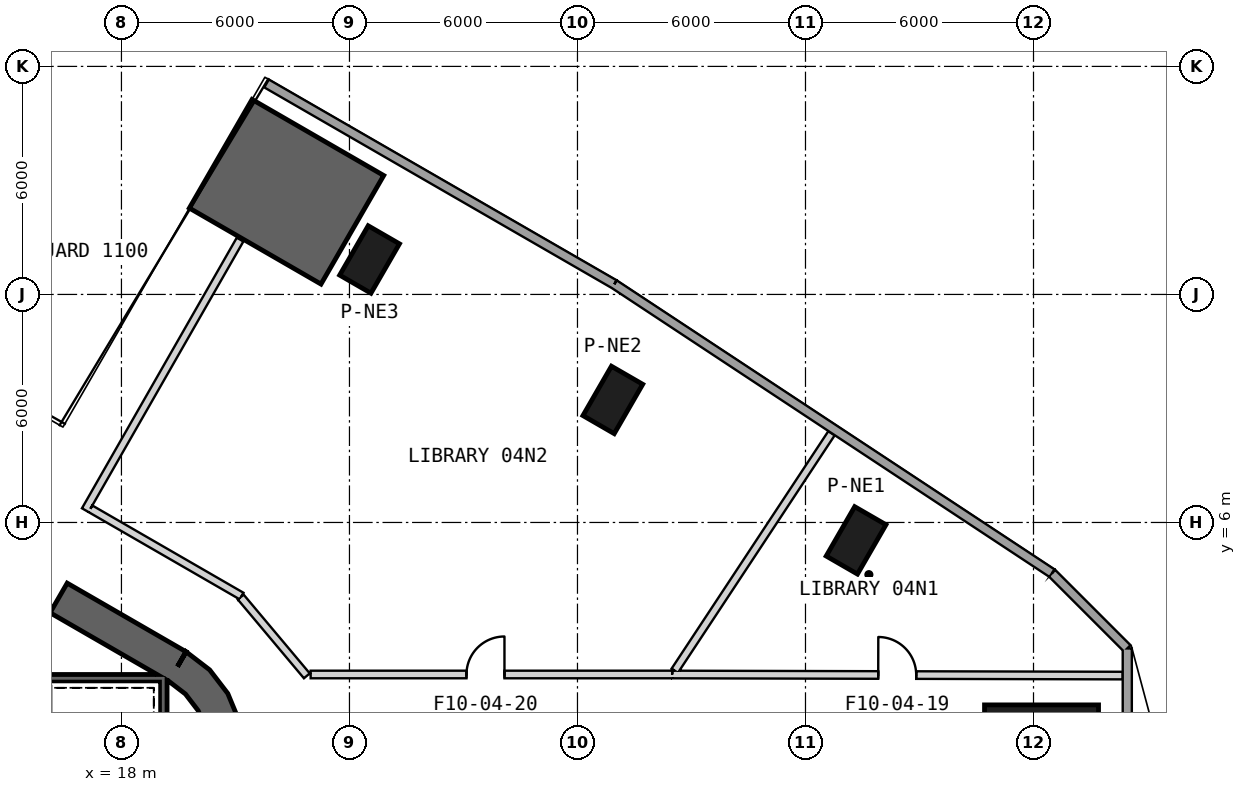
"""IFC4 building model, lengths in metres.
Left out: names, types, materials, properties, quantities, classifications, styles, units other than length and angle.
Written with IfcOpenShell. Run it as: python <this file> out.ifc"""

import sys

from ifc_helpers import new_model, si_unit, direction, frame, frame_2d, origin, origin_2d, place, context, subcontext, project, spatial, polyline, rectangle, outline, extrude, element, fill, save


model = new_model("IFC4")
c1 = context("Model", 3, precision=1e-05, world=origin(), true_north=direction((0.0, 1.0)))
c2 = subcontext(c1, "Body", "Model", "MODEL_VIEW")
j1 = project(units=[si_unit("LENGTHUNIT", "METRE"), si_unit("PLANEANGLEUNIT", "RADIAN")], contexts=[c1])
p1 = place(None, origin())
s1 = spatial("IfcSite", under=j1, at=p1, CompositionType="ELEMENT")
p2 = place(p1, origin())
s2 = spatial("IfcBuilding", under=s1, at=p2, CompositionType="ELEMENT")
p3 = place(p2, frame((0.0, 0.0, 27.5)))
s3 = spatial("IfcBuildingStorey", under=s2, at=p3, CompositionType="ELEMENT", Elevation=27.5)
p4 = place(p3, frame((42.211, 0.0, 0.0), z_axis=(0.0, 0.0, 1.0), x_axis=(1.0, 0.0, 0.0)))
e1 = element("IfcColumn", 1, at=p4, inside=s3, PredefinedType="COLUMN", context=c2, shape_type="SweptSolid", body=[
    extrude(rectangle(XDim=3.0, YDim=2.4, at=origin_2d()), origin(), (0.0, 0.0, 1.0), 6.0),
])
for number, where, z_axis, x_axis in (
    (2, (37.331, 5.528, 0.0), (0.0, 0.0, 1.0), (0.5, 0.866, 0.0)),
    (3, (30.93, 9.224, 0.0), (0.0, 0.0, 1.0), (0.5, 0.866, 0.0)),
    (4, (24.529, 12.92, 0.0), (0.0, 0.0, 1.0), (0.5, 0.866, 0.0)),
):
    element("IfcColumn", number, at=place(p3, frame(where, z_axis=z_axis, x_axis=x_axis)), inside=s3, PredefinedType="COLUMN", context=c2, shape_type="SweptSolid", body=[
        extrude(rectangle(XDim=1.5, YDim=0.95, at=origin_2d()), origin(), (0.0, 0.0, 1.0), 6.0),
    ])
p5 = place(p3, frame((19.475, 2.208, 0.0), z_axis=(0.0, 0.0, 1.0), x_axis=(-0.866028369851, 0.499994862586, 0.0)))
e5 = element("IfcWall", 5, at=p5, inside=s3, PredefinedType="SHEAR", context=c2, shape_type="SweptSolid", body=[
    extrude(rectangle(XDim=31.523, YDim=0.9, at=frame_2d((15.762, 0.0))), origin(), (0.0, 0.0, 1.0), 6.0),
])
p6 = place(p5, frame((7.062, 0.0, 0.0)))
e6 = element("IfcOpeningElement", 6, at=p6, cuts=e5, PredefinedType="OPENING", context=c2, shape_type="SweptSolid", body=[
    extrude(rectangle(XDim=1.2, YDim=2.4, at=frame_2d((0.6, 1.2))), frame((0.0, 0.46, 0.0), z_axis=(0.0, -1.0, 0.0), x_axis=(1.0, 0.0, 0.0)), (0.0, 0.0, 1.0), 0.92),
])
p7 = place(p5, frame((9.762, 0.0, 0.0)))
e7 = element("IfcOpeningElement", 7, at=p7, cuts=e5, PredefinedType="OPENING", context=c2, shape_type="SweptSolid", body=[
    extrude(rectangle(XDim=1.2, YDim=2.4, at=frame_2d((0.6, 1.2))), frame((0.0, 0.46, 0.0), z_axis=(0.0, -1.0, 0.0), x_axis=(1.0, 0.0, 0.0)), (0.0, 0.0, 1.0), 0.92),
])
p8 = place(p5, frame((12.462, 0.0, 0.0)))
e8 = element("IfcOpeningElement", 8, at=p8, cuts=e5, PredefinedType="OPENING", context=c2, shape_type="SweptSolid", body=[
    extrude(rectangle(XDim=1.2, YDim=2.4, at=frame_2d((0.6, 1.2))), frame((0.0, 0.46, 0.0), z_axis=(0.0, -1.0, 0.0), x_axis=(1.0, 0.0, 0.0)), (0.0, 0.0, 1.0), 0.92),
])
p9 = place(p5, frame((15.162, 0.0, 0.0)))
e9 = element("IfcOpeningElement", 9, at=p9, cuts=e5, PredefinedType="OPENING", context=c2, shape_type="SweptSolid", body=[
    extrude(rectangle(XDim=1.2, YDim=2.4, at=frame_2d((0.6, 1.2))), frame((0.0, 0.46, 0.0), z_axis=(0.0, -1.0, 0.0), x_axis=(1.0, 0.0, 0.0)), (0.0, 0.0, 1.0), 0.92),
])
p10 = place(p5, frame((17.862, 0.0, 0.0)))
e10 = element("IfcOpeningElement", 10, at=p10, cuts=e5, PredefinedType="OPENING", context=c2, shape_type="SweptSolid", body=[
    extrude(rectangle(XDim=1.2, YDim=2.4, at=frame_2d((0.6, 1.2))), frame((0.0, 0.46, 0.0), z_axis=(0.0, -1.0, 0.0), x_axis=(1.0, 0.0, 0.0)), (0.0, 0.0, 1.0), 0.92),
])
p11 = place(p5, frame((20.562, 0.0, 0.0)))
e11 = element("IfcOpeningElement", 11, at=p11, cuts=e5, PredefinedType="OPENING", context=c2, shape_type="SweptSolid", body=[
    extrude(rectangle(XDim=1.2, YDim=2.4, at=frame_2d((0.6, 1.2))), frame((0.0, 0.46, 0.0), z_axis=(0.0, -1.0, 0.0), x_axis=(1.0, 0.0, 0.0)), (0.0, 0.0, 1.0), 0.92),
])
p12 = place(p5, frame((23.262, 0.0, 0.0)))
e12 = element("IfcOpeningElement", 12, at=p12, cuts=e5, PredefinedType="OPENING", context=c2, shape_type="SweptSolid", body=[
    extrude(rectangle(XDim=1.2, YDim=2.4, at=frame_2d((0.6, 1.2))), frame((0.0, 0.46, 0.0), z_axis=(0.0, -1.0, 0.0), x_axis=(1.0, 0.0, 0.0)), (0.0, 0.0, 1.0), 0.92),
])
p13 = place(p5, frame((3.612, 0.0, 0.0)))
e13 = element("IfcOpeningElement", 13, at=p13, cuts=e5, PredefinedType="OPENING", context=c2, shape_type="SweptSolid", body=[
    extrude(rectangle(XDim=1.2, YDim=2.4, at=frame_2d((0.6, 1.2))), frame((0.0, 0.46, 0.0), z_axis=(0.0, -1.0, 0.0), x_axis=(1.0, 0.0, 0.0)), (0.0, 0.0, 1.0), 0.92),
])
p14 = place(p5, frame((26.712, 0.0, 0.0)))
e14 = element("IfcOpeningElement", 14, at=p14, cuts=e5, PredefinedType="OPENING", context=c2, shape_type="SweptSolid", body=[
    extrude(rectangle(XDim=1.2, YDim=2.4, at=frame_2d((0.6, 1.2))), frame((0.0, 0.46, 0.0), z_axis=(0.0, -1.0, 0.0), x_axis=(1.0, 0.0, 0.0)), (0.0, 0.0, 1.0), 0.92),
])
p15 = place(p3, origin())
e15 = element("IfcWall", 15, at=p15, inside=s3, PredefinedType="SHEAR", context=c2, shape_type="SweptSolid", body=[
    extrude(outline(polyline([(19.7, -2.598), (20.321, -2.121), (20.798, -1.5), (21.098, -0.777), (21.2, 0.0), (21.098, 0.777), (20.798, 1.5), (20.321, 2.121), (19.7, 2.598), (19.25, 1.819), (19.685, 1.485), (20.019, 1.05), (20.229, 0.543), (20.3, 0.0), (20.229, -0.543), (20.019, -1.05), (19.685, -1.485), (19.25, -1.819), (19.7, -2.598)])), origin(), (0.0, 0.0, 1.0), 6.0),
])
p16 = place(p3, origin())
e16 = element("IfcWall", 16, at=p16, inside=s3, PredefinedType="SHEAR", context=c2, shape_type="SweptSolid", body=[
    extrude(outline(polyline([(24.901, 15.13), (21.437, 17.13), (19.787, 14.272), (23.251, 12.272), (24.901, 15.13)])), origin(), (0.0, 0.0, 1.0), 6.0),
])
p17 = place(p3, frame((42.487, 4.666, 0.0), z_axis=(0.0, 0.0, 1.0), x_axis=(-0.834569880428, 0.550902091739, 0.0)))
e17 = element("IfcWall", 17, at=p17, inside=s3, PredefinedType="SOLIDWALL", context=c2, shape_type="SweptSolid", body=[
    extrude(rectangle(XDim=13.802, YDim=0.24, at=frame_2d((6.901, 0.0))), origin(), (0.0, 0.0, 1.0), 5.7),
])
p18 = place(p3, frame((30.969, 12.269, 0.0), z_axis=(0.0, 0.0, 1.0), x_axis=(-0.86605207128, 0.499953807697, 0.0)))
e18 = element("IfcWall", 18, at=p18, inside=s3, PredefinedType="SOLIDWALL", context=c2, shape_type="SweptSolid", body=[
    extrude(rectangle(XDim=10.566, YDim=0.24, at=frame_2d((5.283, 0.0))), origin(), (0.0, 0.0, 1.0), 5.7),
])
p19 = place(p3, frame((44.468, -2.686, 0.0), z_axis=(0.0, 0.0, 1.0), x_axis=(0.0, 1.0, 0.0)))
e19 = element("IfcWall", 19, at=p19, inside=s3, PredefinedType="SOLIDWALL", context=c2, shape_type="SweptSolid", body=[
    extrude(rectangle(XDim=5.371, YDim=0.24, at=frame_2d((2.686, 0.0))), origin(), (0.0, 0.0, 1.0), 5.7),
])
p20 = place(p3, frame((44.468, 2.686, 0.0), z_axis=(0.0, 0.0, 1.0), x_axis=(-0.707106781187, 0.707106781187, 0.0)))
e20 = element("IfcWall", 20, at=p20, inside=s3, PredefinedType="SOLIDWALL", context=c2, shape_type="SweptSolid", body=[
    extrude(rectangle(XDim=2.801, YDim=0.24, at=frame_2d((1.4, 0.0))), origin(), (0.0, 0.0, 1.0), 5.7),
])
p21 = place(p3, frame((19.2, 1.9, -0.3), z_axis=(0.0, 0.0, 1.0), x_axis=(-1.0, 0.0, 0.0)))
e21 = element("IfcWall", 21, at=p21, inside=s3, PredefinedType="SHEAR", context=c2, shape_type="SweptSolid", body=[
    extrude(rectangle(XDim=8.1, YDim=0.2, at=frame_2d((4.05, 0.0))), origin(), (0.0, 0.0, 1.0), 6.0),
])
p22 = place(p3, frame((19.1, 0.11, -0.3), z_axis=(0.0, 0.0, 1.0), x_axis=(0.0, 1.0, 0.0)))
e22 = element("IfcWall", 22, at=p22, inside=s3, PredefinedType="SHEAR", context=c2, shape_type="SweptSolid", body=[
    extrude(rectangle(XDim=1.69, YDim=0.2, at=frame_2d((0.845, 0.0))), origin(), (0.0, 0.0, 1.0), 6.0),
])
p23 = place(p3, frame((32.492, 2.0, 0.0), z_axis=(0.0, 0.0, 1.0), x_axis=(0.999997146718, -0.002388839742, 0.0)))
e23 = element("IfcWall", 23, at=p23, inside=s3, PredefinedType="PARTITIONING", context=c2, shape_type="SweptSolid", body=[
    extrude(rectangle(XDim=11.855, YDim=0.2, at=frame_2d((5.928, 0.0))), origin(), (0.0, 0.0, 1.0), 5.7),
])
p24 = place(p23, frame((5.421, 0.0, 0.0)))
e24 = element("IfcOpeningElement", 24, at=p24, cuts=e23, PredefinedType="OPENING", context=c2, shape_type="SweptSolid", body=[
    extrude(rectangle(XDim=1.0, YDim=2.1, at=frame_2d((0.5, 1.05))), frame((0.0, 0.11, 0.0), z_axis=(0.0, -1.0, 0.0), x_axis=(1.0, 0.0, 0.0)), (0.0, 0.0, 1.0), 0.22),
])
p25 = place(p3, frame((17.048, 6.323, 0.0), z_axis=(0.0, 0.0, 1.0), x_axis=(0.496629236268, 0.86796278819, 0.0)))
e25 = element("IfcWall", 25, at=p25, inside=s3, PredefinedType="PARTITIONING", context=c2, shape_type="SweptSolid", body=[
    extrude(rectangle(XDim=8.203, YDim=0.2, at=frame_2d((4.102, 0.0))), origin(), (0.0, 0.0, 1.0), 5.17),
])
p26 = place(p3, frame((21.161, 4.064, 0.0), z_axis=(0.0, 0.0, 1.0), x_axis=(-0.866012938262, 0.500021590297, 0.0)))
e26 = element("IfcWall", 26, at=p26, inside=s3, PredefinedType="PARTITIONING", context=c2, shape_type="SweptSolid", body=[
    extrude(rectangle(XDim=4.592, YDim=0.2, at=frame_2d((2.296, 0.0))), origin(), (0.0, 0.0, 1.0), 4.88),
])
p27 = place(p3, frame((22.878, 1.964, 0.0), z_axis=(0.0, 0.0, 1.0), x_axis=(-0.642859908207, 0.765983771643, 0.0)))
e27 = element("IfcWall", 27, at=p27, inside=s3, PredefinedType="PARTITIONING", context=c2, shape_type="SweptSolid", body=[
    extrude(rectangle(XDim=2.707, YDim=0.2, at=frame_2d((1.353, 0.0))), origin(), (0.0, 0.0, 1.0), 4.78),
])
p28 = place(p3, frame((22.979, 2.0, 0.0), z_axis=(0.0, 0.0, 1.0), x_axis=(1.0, 0.0, 0.0)))
e28 = element("IfcWall", 28, at=p28, inside=s3, PredefinedType="PARTITIONING", context=c2, shape_type="SweptSolid", body=[
    extrude(rectangle(XDim=9.513, YDim=0.2, at=frame_2d((4.757, 0.0))), origin(), (0.0, 0.0, 1.0), 5.7),
])
p29 = place(p28, frame((4.1, 0.0, 0.0)))
e29 = element("IfcOpeningElement", 29, at=p29, cuts=e28, PredefinedType="OPENING", context=c2, shape_type="SweptSolid", body=[
    extrude(rectangle(XDim=1.0, YDim=2.1, at=frame_2d((0.5, 1.05))), frame((0.0, 0.11, 0.0), z_axis=(0.0, -1.0, 0.0), x_axis=(1.0, 0.0, 0.0)), (0.0, 0.0, 1.0), 0.22),
])
p30 = place(p3, frame((32.561, 2.1, 0.0), z_axis=(0.0, 0.0, 1.0), x_axis=(0.550900824842, 0.834570716709, 0.0)))
e30 = element("IfcWall", 30, at=p30, inside=s3, PredefinedType="PARTITIONING", context=c2, shape_type="SweptSolid", body=[
    extrude(rectangle(XDim=7.485, YDim=0.2, at=frame_2d((3.743, 0.0))), origin(), (0.0, 0.0, 1.0), 4.78),
])
p31 = place(p24, origin())
e31 = element("IfcDoor", 31, at=p31, inside=s3, OperationType="SINGLE_SWING_LEFT", PredefinedType="USERDEFINED", context=c2, shape_type="SweptSolid", body=[
    extrude(rectangle(XDim=1.0, YDim=2.1, at=frame_2d((0.5, 1.05))), frame((0.0, 0.025, 0.0), z_axis=(0.0, -1.0, 0.0), x_axis=(1.0, 0.0, 0.0)), (0.0, 0.0, 1.0), 0.05),
])
fill(e24, e31)
p32 = place(p29, origin())
e32 = element("IfcDoor", 32, at=p32, inside=s3, OperationType="SINGLE_SWING_RIGHT", PredefinedType="USERDEFINED", context=c2, shape_type="SweptSolid", body=[
    extrude(rectangle(XDim=1.0, YDim=2.1, at=frame_2d((0.5, 1.05))), frame((0.0, 0.025, 0.0), z_axis=(0.0, -1.0, 0.0), x_axis=(1.0, 0.0, 0.0)), (0.0, 0.0, 1.0), 0.05),
])
fill(e29, e32)
p33 = place(p13, origin())
e33 = element("IfcDoor", 33, at=p33, inside=s3, OperationType="SINGLE_SWING_RIGHT", PredefinedType="USERDEFINED", context=c2, shape_type="SweptSolid", body=[
    extrude(rectangle(XDim=1.2, YDim=2.4, at=frame_2d((0.6, 1.2))), frame((0.0, 0.025, 0.0), z_axis=(0.0, -1.0, 0.0), x_axis=(1.0, 0.0, 0.0)), (0.0, 0.0, 1.0), 0.05),
])
fill(e13, e33)
save(model, sys.argv[1])
